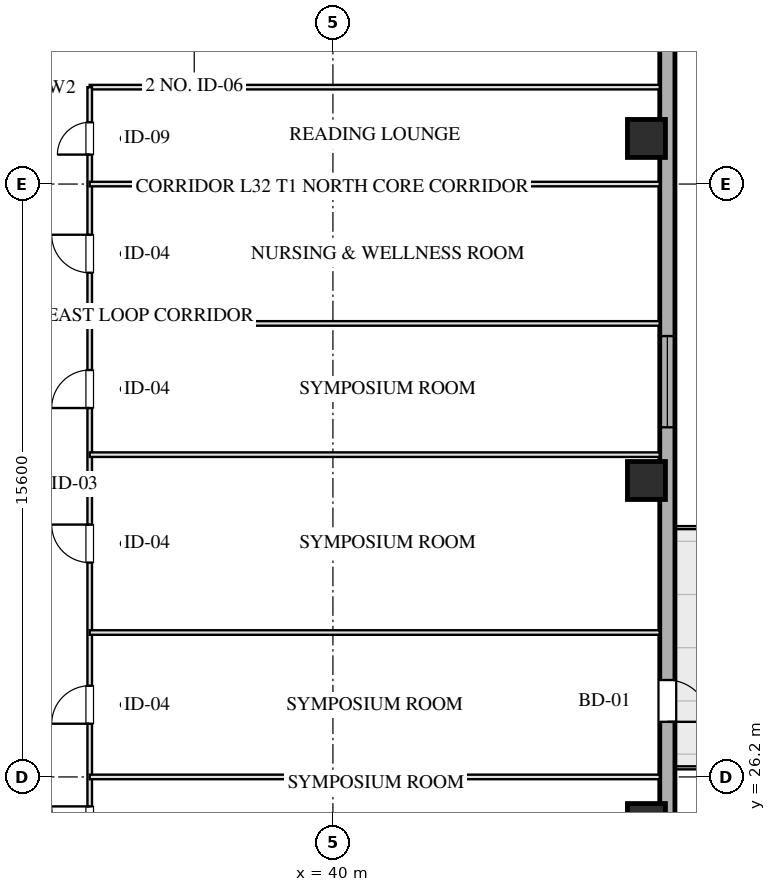
"""IFC4 building model, lengths in metres.
Left out: names, types, materials, properties, quantities, classifications, styles, units other than length and angle.
Written with IfcOpenShell. Run it as: python <this file> out.ifc"""

import sys

from ifc_helpers import new_model, si_unit, direction, frame, frame_2d, origin, origin_2d, place, context, subcontext, project, spatial, rectangle, hollow_rectangle, extrude, element, fill, save


model = new_model("IFC4")
c1 = context("Model", 3, precision=1e-05, world=origin(), true_north=direction((0.0, 1.0)))
c2 = subcontext(c1, "Body", "Model", "MODEL_VIEW")
j1 = project(units=[si_unit("LENGTHUNIT", "METRE"), si_unit("PLANEANGLEUNIT", "RADIAN")], contexts=[c1])
p1 = place(None, origin())
s1 = spatial("IfcSite", under=j1, at=p1, CompositionType="ELEMENT")
p2 = place(p1, origin())
s2 = spatial("IfcBuilding", under=s1, at=p2, CompositionType="ELEMENT")
p3 = place(p2, frame((0.0, 0.0, 124.2)))
s3 = spatial("IfcBuildingStorey", under=s2, at=p3, CompositionType="ELEMENT", Elevation=124.2)
for number, where, z_axis, x_axis in (
    (1, (48.25, 25.0, 0.0), (0.0, 0.0, 1.0), (1.0, 0.0, 0.0)),
    (2, (48.25, 34.0, 0.0), (0.0, 0.0, 1.0), (1.0, 0.0, 0.0)),
    (3, (48.25, 43.0, 0.0), (0.0, 0.0, 1.0), (1.0, 0.0, 0.0)),
):
    element("IfcColumn", number, at=place(p3, frame(where, z_axis=z_axis, x_axis=x_axis)), inside=s3, PredefinedType="COLUMN", context=c2, shape_type="SweptSolid", body=[
        extrude(hollow_rectangle(XDim=1.0, YDim=1.0, WallThickness=0.036, at=origin_2d()), origin(), (0.0, 0.0, 1.0), 3.451),
    ])
p4 = place(p3, frame((48.8, 59.0, 0.0), z_axis=(0.0, 0.0, 1.0), x_axis=(0.0, -1.0, 0.0)))
e4 = element("IfcWall", 4, at=p4, inside=s3, PredefinedType="SOLIDWALL", context=c2, shape_type="SweptSolid", body=[
    extrude(rectangle(XDim=50.0, YDim=0.4, at=frame_2d((25.0, 0.0))), origin(), (0.0, 0.0, 1.0), 2.61),
])
p5 = place(p4, frame((21.2, 0.0, 0.75)))
e5 = element("IfcOpeningElement", 5, at=p5, cuts=e4, PredefinedType="OPENING", context=c2, shape_type="SweptSolid", body=[
    extrude(rectangle(XDim=2.4, YDim=1.46, at=frame_2d((1.2, 0.73))), frame((0.0, 0.21, 0.0), z_axis=(0.0, -1.0, 0.0), x_axis=(1.0, 0.0, 0.0)), (0.0, 0.0, 1.0), 0.42),
])
p6 = place(p4, frame((30.25, 0.0, 0.0)))
e6 = element("IfcOpeningElement", 6, at=p6, cuts=e4, PredefinedType="OPENING", context=c2, shape_type="SweptSolid", body=[
    extrude(rectangle(XDim=1.1, YDim=2.15, at=frame_2d((0.55, 1.075))), frame((0.0, 0.21, 0.0), z_axis=(0.0, -1.0, 0.0), x_axis=(1.0, 0.0, 0.0)), (0.0, 0.0, 1.0), 0.42),
])
p7 = place(p3, frame((33.6, 44.35, 0.0), z_axis=(0.0, 0.0, 1.0), x_axis=(1.0, 0.0, 0.0)))
e7 = element("IfcWall", 7, at=p7, inside=s3, PredefinedType="PARTITIONING", context=c2, shape_type="SweptSolid", body=[
    extrude(rectangle(XDim=15.0, YDim=0.12, at=frame_2d((7.5, 0.0))), origin(), (0.0, 0.0, 1.0), 3.175),
])
p8 = place(p3, frame((33.6, 23.65, 0.0), z_axis=(0.0, 0.0, 1.0), x_axis=(0.0, 1.0, 0.0)))
e8 = element("IfcWall", 8, at=p8, inside=s3, PredefinedType="PARTITIONING", context=c2, shape_type="SweptSolid", body=[
    extrude(rectangle(XDim=20.7, YDim=0.12, at=frame_2d((10.35, 0.0))), origin(), (0.0, 0.0, 1.0), 3.175),
])
p9 = place(p8, frame((0.775, 0.0, 0.0)))
e9 = element("IfcOpeningElement", 9, at=p9, cuts=e8, PredefinedType="OPENING", context=c2, shape_type="SweptSolid", body=[
    extrude(rectangle(XDim=1.0, YDim=2.05, at=frame_2d((0.5, 1.025))), frame((0.0, 0.07, 0.0), z_axis=(0.0, -1.0, 0.0), x_axis=(1.0, 0.0, 0.0)), (0.0, 0.0, 1.0), 0.14),
])
p10 = place(p8, frame((3.95, 0.0, 0.0)))
e10 = element("IfcOpeningElement", 10, at=p10, cuts=e8, PredefinedType="OPENING", context=c2, shape_type="SweptSolid", body=[
    extrude(rectangle(XDim=1.0, YDim=2.05, at=frame_2d((0.5, 1.025))), frame((0.0, 0.07, 0.0), z_axis=(0.0, -1.0, 0.0), x_axis=(1.0, 0.0, 0.0)), (0.0, 0.0, 1.0), 0.14),
])
p11 = place(p8, frame((8.19, 0.0, 0.0)))
e11 = element("IfcOpeningElement", 11, at=p11, cuts=e8, PredefinedType="OPENING", context=c2, shape_type="SweptSolid", body=[
    extrude(rectangle(XDim=1.0, YDim=2.05, at=frame_2d((0.5, 1.025))), frame((0.0, 0.07, 0.0), z_axis=(0.0, -1.0, 0.0), x_axis=(1.0, 0.0, 0.0)), (0.0, 0.0, 1.0), 0.14),
])
p12 = place(p8, frame((12.257, 0.0, 0.0)))
e12 = element("IfcOpeningElement", 12, at=p12, cuts=e8, PredefinedType="OPENING", context=c2, shape_type="SweptSolid", body=[
    extrude(rectangle(XDim=1.0, YDim=2.05, at=frame_2d((0.5, 1.025))), frame((0.0, 0.07, 0.0), z_axis=(0.0, -1.0, 0.0), x_axis=(1.0, 0.0, 0.0)), (0.0, 0.0, 1.0), 0.14),
])
p13 = place(p8, frame((15.816, 0.0, 0.0)))
e13 = element("IfcOpeningElement", 13, at=p13, cuts=e8, PredefinedType="OPENING", context=c2, shape_type="SweptSolid", body=[
    extrude(rectangle(XDim=1.0, YDim=2.05, at=frame_2d((0.5, 1.025))), frame((0.0, 0.07, 0.0), z_axis=(0.0, -1.0, 0.0), x_axis=(1.0, 0.0, 0.0)), (0.0, 0.0, 1.0), 0.14),
])
p14 = place(p8, frame((18.925, 0.0, 0.0)))
e14 = element("IfcOpeningElement", 14, at=p14, cuts=e8, PredefinedType="OPENING", context=c2, shape_type="SweptSolid", body=[
    extrude(rectangle(XDim=0.85, YDim=2.05, at=frame_2d((0.425, 1.025))), frame((0.0, 0.07, 0.0), z_axis=(0.0, -1.0, 0.0), x_axis=(1.0, 0.0, 0.0)), (0.0, 0.0, 1.0), 0.14),
])
for number, where, z_axis, x_axis in (
    (15, (33.6, 26.2, 0.0), (0.0, 0.0, 1.0), (1.0, 0.0, 0.0)),
    (16, (33.6, 30.0, 0.0), (0.0, 0.0, 1.0), (1.0, 0.0, 0.0)),
    (17, (33.6, 34.68, 0.0), (0.0, 0.0, 1.0), (1.0, 0.0, 0.0)),
    (18, (33.6, 38.133, 0.0), (0.0, 0.0, 1.0), (1.0, 0.0, 0.0)),
    (19, (33.6, 41.8, 0.0), (0.0, 0.0, 1.0), (1.0, 0.0, 0.0)),
):
    element("IfcWall", number, at=place(p3, frame(where, z_axis=z_axis, x_axis=x_axis)), inside=s3, PredefinedType="PARTITIONING", context=c2, shape_type="SweptSolid", body=[
        extrude(rectangle(XDim=15.0, YDim=0.12, at=frame_2d((7.5, 0.0))), origin(), (0.0, 0.0, 1.0), 3.175),
    ])
p15 = place(p5, origin())
e20 = element("IfcWindow", 20, at=p15, inside=s3, PartitioningType="TRIPLE_PANEL_VERTICAL", PredefinedType="WINDOW", context=c2, shape_type="SweptSolid", body=[
    extrude(rectangle(XDim=2.4, YDim=1.46, at=frame_2d((1.2, 0.73))), frame((0.0, 0.03, 0.0), z_axis=(0.0, -1.0, 0.0), x_axis=(1.0, 0.0, 0.0)), (0.0, 0.0, 1.0), 0.06),
])
fill(e5, e20)
p16 = place(p6, origin())
e21 = element("IfcDoor", 21, at=p16, inside=s3, OperationType="SINGLE_SWING_RIGHT", PredefinedType="DOOR", context=c2, shape_type="SweptSolid", body=[
    extrude(rectangle(XDim=1.1, YDim=2.15, at=frame_2d((0.55, 1.075))), frame((0.0, 0.025, 0.0), z_axis=(0.0, -1.0, 0.0), x_axis=(1.0, 0.0, 0.0)), (0.0, 0.0, 1.0), 0.05),
])
fill(e6, e21)
p17 = place(p9, origin())
e22 = element("IfcDoor", 22, at=p17, inside=s3, OperationType="SINGLE_SWING_RIGHT", PredefinedType="DOOR", context=c2, shape_type="SweptSolid", body=[
    extrude(rectangle(XDim=1.0, YDim=2.05, at=frame_2d((0.5, 1.025))), frame((0.0, 0.025, 0.0), z_axis=(0.0, -1.0, 0.0), x_axis=(1.0, 0.0, 0.0)), (0.0, 0.0, 1.0), 0.05),
])
fill(e9, e22)
p18 = place(p10, origin())
e23 = element("IfcDoor", 23, at=p18, inside=s3, OperationType="SINGLE_SWING_LEFT", PredefinedType="DOOR", context=c2, shape_type="SweptSolid", body=[
    extrude(rectangle(XDim=1.0, YDim=2.05, at=frame_2d((0.5, 1.025))), frame((0.0, 0.025, 0.0), z_axis=(0.0, -1.0, 0.0), x_axis=(1.0, 0.0, 0.0)), (0.0, 0.0, 1.0), 0.05),
])
fill(e10, e23)
p19 = place(p11, origin())
e24 = element("IfcDoor", 24, at=p19, inside=s3, OperationType="SINGLE_SWING_RIGHT", PredefinedType="DOOR", context=c2, shape_type="SweptSolid", body=[
    extrude(rectangle(XDim=1.0, YDim=2.05, at=frame_2d((0.5, 1.025))), frame((0.0, 0.025, 0.0), z_axis=(0.0, -1.0, 0.0), x_axis=(1.0, 0.0, 0.0)), (0.0, 0.0, 1.0), 0.05),
])
fill(e11, e24)
p20 = place(p12, origin())
e25 = element("IfcDoor", 25, at=p20, inside=s3, OperationType="SINGLE_SWING_LEFT", PredefinedType="DOOR", context=c2, shape_type="SweptSolid", body=[
    extrude(rectangle(XDim=1.0, YDim=2.05, at=frame_2d((0.5, 1.025))), frame((0.0, 0.025, 0.0), z_axis=(0.0, -1.0, 0.0), x_axis=(1.0, 0.0, 0.0)), (0.0, 0.0, 1.0), 0.05),
])
fill(e12, e25)
p21 = place(p13, origin())
e26 = element("IfcDoor", 26, at=p21, inside=s3, OperationType="SINGLE_SWING_RIGHT", PredefinedType="DOOR", context=c2, shape_type="SweptSolid", body=[
    extrude(rectangle(XDim=1.0, YDim=2.05, at=frame_2d((0.5, 1.025))), frame((0.0, 0.025, 0.0), z_axis=(0.0, -1.0, 0.0), x_axis=(1.0, 0.0, 0.0)), (0.0, 0.0, 1.0), 0.05),
])
fill(e13, e26)
p22 = place(p14, origin())
e27 = element("IfcDoor", 27, at=p22, inside=s3, OperationType="SINGLE_SWING_LEFT", PredefinedType="DOOR", context=c2, shape_type="SweptSolid", body=[
    extrude(rectangle(XDim=0.85, YDim=2.05, at=frame_2d((0.425, 1.025))), frame((0.0, 0.025, 0.0), z_axis=(0.0, -1.0, 0.0), x_axis=(1.0, 0.0, 0.0)), (0.0, 0.0, 1.0), 0.05),
])
fill(e14, e27)
save(model, sys.argv[1])
